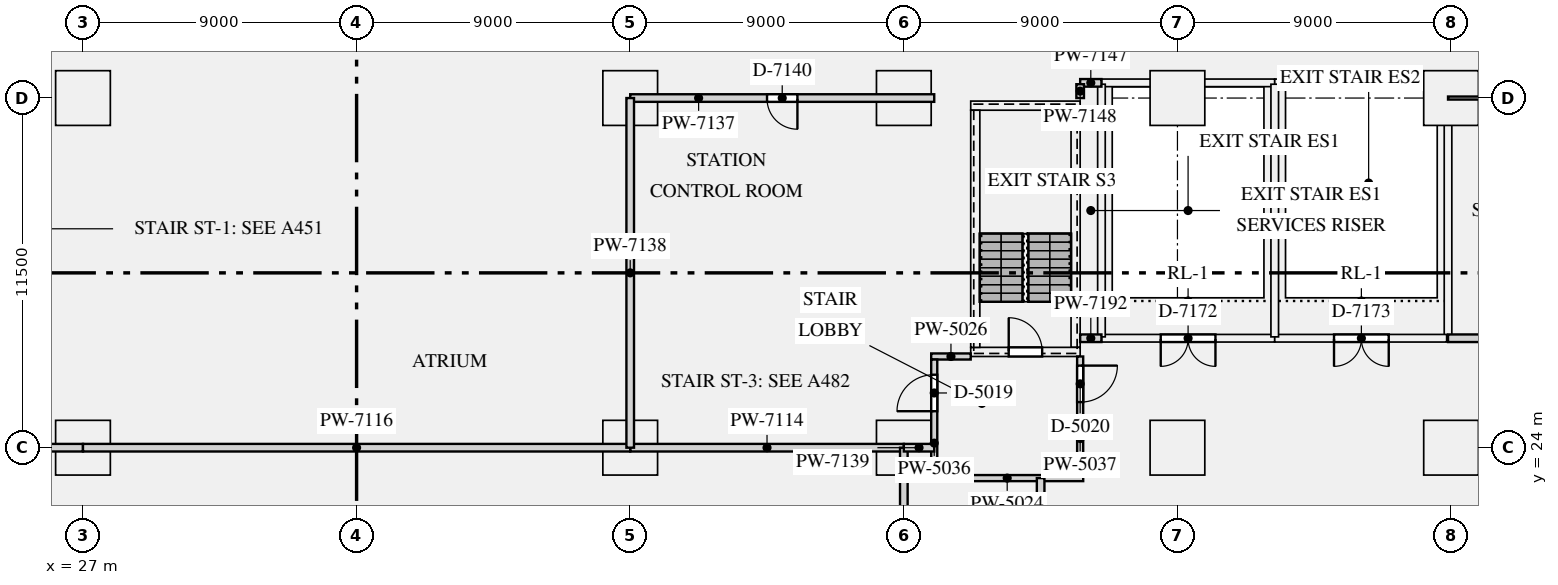
"""IFC4 building model, lengths in metres.
Left out: names, types, materials, properties, quantities, classifications, styles, units other than length and angle.
Written with IfcOpenShell. Run it as: python <this file> out.ifc"""

import sys

from ifc_helpers import new_model, si_unit, direction, frame, frame_2d, origin, origin_2d, place, context, subcontext, project, spatial, rectangle, extrude, element, fill, save


model = new_model("IFC4")
c1 = context("Model", 3, precision=1e-05, world=origin(), true_north=direction((0.0, 1.0)))
c2 = subcontext(c1, "Body", "Model", "MODEL_VIEW")
j1 = project(units=[si_unit("LENGTHUNIT", "METRE"), si_unit("PLANEANGLEUNIT", "RADIAN")], contexts=[c1])
p1 = place(None, origin())
s1 = spatial("IfcSite", under=j1, at=p1, CompositionType="ELEMENT")
p2 = place(p1, origin())
s2 = spatial("IfcBuilding", under=s1, at=p2, CompositionType="ELEMENT")
p3 = place(p2, origin())
s3 = spatial("IfcBuildingStorey", under=s2, at=p3, CompositionType="ELEMENT", Elevation=0.0)
for number, where, z_axis, x_axis in (
    (1, (27.0, 24.0, 0.0), (0.0, 0.0, 1.0), (1.0, 0.0, 0.0)),
    (2, (27.0, 35.5, 0.0), (0.0, 0.0, 1.0), (1.0, 0.0, 0.0)),
    (3, (45.0, 24.0, 0.0), (0.0, 0.0, 1.0), (1.0, 0.0, 0.0)),
    (4, (45.0, 35.5, 0.0), (0.0, 0.0, 1.0), (1.0, 0.0, 0.0)),
    (5, (54.0, 24.0, 0.0), (0.0, 0.0, 1.0), (1.0, 0.0, 0.0)),
    (6, (54.0, 35.5, 0.0), (0.0, 0.0, 1.0), (1.0, 0.0, 0.0)),
    (7, (63.0, 24.0, 0.0), (0.0, 0.0, 1.0), (1.0, 0.0, 0.0)),
    (8, (63.0, 35.5, 0.0), (0.0, 0.0, 1.0), (1.0, 0.0, 0.0)),
    (9, (72.0, 24.0, 0.0), (0.0, 0.0, 1.0), (1.0, 0.0, 0.0)),
    (10, (72.0, 35.5, 0.0), (0.0, 0.0, 1.0), (1.0, 0.0, 0.0)),
):
    element("IfcColumn", number, at=place(p3, frame(where, z_axis=z_axis, x_axis=x_axis)), inside=s3, PredefinedType="COLUMN", context=c2, shape_type="SweptSolid", body=[
        extrude(rectangle(XDim=1.8, YDim=1.8, at=origin_2d()), origin(), (0.0, 0.0, 1.0), 6.5),
    ])
p4 = place(p3, frame((56.2, 27.15, 0.0), z_axis=(0.0, 0.0, 1.0), x_axis=(1.0, 0.0, 0.0)))
e11 = element("IfcWall", 11, at=p4, inside=s3, PredefinedType="SHEAR", context=c2, shape_type="SweptSolid", body=[
    extrude(rectangle(XDim=3.6, YDim=0.3, at=frame_2d((1.8, 0.0))), origin(), (0.0, 0.0, 1.0), 6.5),
])
p5 = place(p4, frame((1.25, 0.0, 0.0)))
e12 = element("IfcOpeningElement", 12, at=p5, cuts=e11, PredefinedType="OPENING", context=c2, shape_type="SweptSolid", body=[
    extrude(rectangle(XDim=1.1, YDim=2.1, at=frame_2d((0.55, 1.05))), frame((0.0, 0.16, 0.0), z_axis=(0.0, -1.0, 0.0), x_axis=(1.0, 0.0, 0.0)), (0.0, 0.0, 1.0), 0.32),
])
p6 = place(p3, frame((56.2, 35.25, 0.0), z_axis=(0.0, 0.0, 1.0), x_axis=(1.0, 0.0, 0.0)))
e13 = element("IfcWall", 13, at=p6, inside=s3, PredefinedType="SHEAR", context=c2, shape_type="SweptSolid", body=[
    extrude(rectangle(XDim=3.6, YDim=0.3, at=frame_2d((1.8, 0.0))), origin(), (0.0, 0.0, 1.0), 6.5),
])
for number, where, z_axis, x_axis in (
    (14, (56.35, 27.3, 0.0), (0.0, 0.0, 1.0), (0.0, 1.0, 0.0)),
    (15, (59.65, 27.3, 0.0), (0.0, 0.0, 1.0), (0.0, 1.0, 0.0)),
):
    element("IfcWall", number, at=place(p3, frame(where, z_axis=z_axis, x_axis=x_axis)), inside=s3, PredefinedType="SHEAR", context=c2, shape_type="SweptSolid", body=[
        extrude(rectangle(XDim=7.8, YDim=0.3, at=frame_2d((3.9, 0.0))), origin(), (0.0, 0.0, 1.0), 6.5),
    ])
p7 = place(p3, frame((54.9, 23.0, 0.0), z_axis=(0.0, 0.0, 1.0), x_axis=(1.0, 0.0, 0.0)))
e16 = element("IfcWall", 16, at=p7, inside=s3, PredefinedType="PARTITIONING", context=c2, shape_type="SweptSolid", body=[
    extrude(rectangle(XDim=5.0, YDim=0.2, at=frame_2d((2.5, 0.0))), origin(), (0.0, 0.0, 1.0), 6.098),
])
p8 = place(p3, frame((54.9, 27.0, 0.0), z_axis=(0.0, 0.0, 1.0), x_axis=(1.0, 0.0, 0.0)))
e17 = element("IfcWall", 17, at=p8, inside=s3, PredefinedType="PARTITIONING", context=c2, shape_type="SweptSolid", body=[
    extrude(rectangle(XDim=1.3, YDim=0.2, at=frame_2d((0.65, 0.0))), origin(), (0.0, 0.0, 1.0), 6.098),
])
p9 = place(p3, frame((55.0, 23.1, 0.0), z_axis=(0.0, 0.0, 1.0), x_axis=(0.0, 1.0, 0.0)))
e18 = element("IfcWall", 18, at=p9, inside=s3, PredefinedType="PARTITIONING", context=c2, shape_type="SweptSolid", body=[
    extrude(rectangle(XDim=3.8, YDim=0.2, at=frame_2d((1.9, 0.0))), origin(), (0.0, 0.0, 1.0), 6.098),
])
p10 = place(p9, frame((2.1, 0.0, 0.0)))
e19 = element("IfcOpeningElement", 19, at=p10, cuts=e18, PredefinedType="OPENING", context=c2, shape_type="SweptSolid", body=[
    extrude(rectangle(XDim=1.2, YDim=2.1, at=frame_2d((0.6, 1.05))), frame((0.0, 0.11, 0.0), z_axis=(0.0, -1.0, 0.0), x_axis=(1.0, 0.0, 0.0)), (0.0, 0.0, 1.0), 0.22),
])
p11 = place(p3, frame((59.8, 23.1, 0.0), z_axis=(0.0, 0.0, 1.0), x_axis=(0.0, 1.0, 0.0)))
e20 = element("IfcWall", 20, at=p11, inside=s3, PredefinedType="PARTITIONING", context=c2, shape_type="SweptSolid", body=[
    extrude(rectangle(XDim=3.9, YDim=0.2, at=frame_2d((1.95, 0.0))), origin(), (0.0, 0.0, 1.0), 6.098),
])
p12 = place(p11, frame((2.4, 0.0, 0.0)))
e21 = element("IfcOpeningElement", 21, at=p12, cuts=e20, PredefinedType="OPENING", context=c2, shape_type="SweptSolid", body=[
    extrude(rectangle(XDim=1.2, YDim=2.1, at=frame_2d((0.6, 1.05))), frame((0.0, 0.11, 0.0), z_axis=(0.0, -1.0, 0.0), x_axis=(1.0, 0.0, 0.0)), (0.0, 0.0, 1.0), 0.22),
])
p13 = place(p3, frame((45.0, 24.0, 0.0), z_axis=(0.0, 0.0, 1.0), x_axis=(1.0, 0.0, 0.0)))
e22 = element("IfcWall", 22, at=p13, inside=s3, PredefinedType="PARTITIONING", context=c2, shape_type="SweptSolid", body=[
    extrude(rectangle(XDim=9.0, YDim=0.25, at=frame_2d((4.5, 0.0))), origin(), (0.0, 0.0, 1.0), 6.098),
])
p14 = place(p3, frame((17.0, 24.0, 0.0), z_axis=(0.0, 0.0, 1.0), x_axis=(1.0, 0.0, 0.0)))
e23 = element("IfcWall", 23, at=p14, inside=s3, PredefinedType="PARTITIONING", context=c2, shape_type="SweptSolid", body=[
    extrude(rectangle(XDim=10.0, YDim=0.25, at=frame_2d((5.0, 0.0))), origin(), (0.0, 0.0, 1.0), 6.098),
])
p15 = place(p3, frame((27.0, 24.0, 0.0), z_axis=(0.0, 0.0, 1.0), x_axis=(1.0, 0.0, 0.0)))
e24 = element("IfcWall", 24, at=p15, inside=s3, PredefinedType="PARTITIONING", context=c2, shape_type="SweptSolid", body=[
    extrude(rectangle(XDim=18.0, YDim=0.25, at=frame_2d((9.0, 0.0))), origin(), (0.0, 0.0, 1.0), 5.148),
])
p16 = place(p3, frame((54.0, 16.0, 0.0), z_axis=(0.0, 0.0, 1.0), x_axis=(0.0, 1.0, 0.0)))
e25 = element("IfcWall", 25, at=p16, inside=s3, PredefinedType="PARTITIONING", context=c2, shape_type="SweptSolid", body=[
    extrude(rectangle(XDim=8.0, YDim=0.25, at=frame_2d((4.0, 0.0))), origin(), (0.0, 0.0, 1.0), 6.098),
])
p17 = place(p16, frame((3.1, 0.0, 0.0)))
e26 = element("IfcOpeningElement", 26, at=p17, cuts=e25, PredefinedType="OPENING", context=c2, shape_type="SweptSolid", body=[
    extrude(rectangle(XDim=1.8, YDim=2.4, at=frame_2d((0.9, 1.2))), frame((0.0, 0.135, 0.0), z_axis=(0.0, -1.0, 0.0), x_axis=(1.0, 0.0, 0.0)), (0.0, 0.0, 1.0), 0.27),
])
p18 = place(p3, frame((45.0, 35.5, 0.0), z_axis=(0.0, 0.0, 1.0), x_axis=(1.0, 0.0, 0.0)))
e27 = element("IfcWall", 27, at=p18, inside=s3, PredefinedType="PARTITIONING", context=c2, shape_type="SweptSolid", body=[
    extrude(rectangle(XDim=10.0, YDim=0.25, at=frame_2d((5.0, 0.0))), origin(), (0.0, 0.0, 1.0), 6.098),
])
p19 = place(p18, frame((4.5, 0.0, 0.0)))
e28 = element("IfcOpeningElement", 28, at=p19, cuts=e27, PredefinedType="OPENING", context=c2, shape_type="SweptSolid", body=[
    extrude(rectangle(XDim=1.0, YDim=2.1, at=frame_2d((0.5, 1.05))), frame((0.0, 0.135, 0.0), z_axis=(0.0, -1.0, 0.0), x_axis=(1.0, 0.0, 0.0)), (0.0, 0.0, 1.0), 0.27),
])
p20 = place(p3, frame((45.0, 24.0, 0.0), z_axis=(0.0, 0.0, 1.0), x_axis=(0.0, 1.0, 0.0)))
e29 = element("IfcWall", 29, at=p20, inside=s3, PredefinedType="PARTITIONING", context=c2, shape_type="SweptSolid", body=[
    extrude(rectangle(XDim=11.5, YDim=0.25, at=frame_2d((5.75, 0.0))), origin(), (0.0, 0.0, 1.0), 5.148),
])
p21 = place(p3, frame((54.0, 24.0, 0.0), z_axis=(0.0, 0.0, 1.0), x_axis=(1.0, 0.0, 0.0)))
e30 = element("IfcWall", 30, at=p21, inside=s3, PredefinedType="PARTITIONING", context=c2, shape_type="SweptSolid", body=[
    extrude(rectangle(XDim=1.0, YDim=0.25, at=frame_2d((0.5, 0.0))), origin(), (0.0, 0.0, 1.0), 6.098),
])
p22 = place(p3, frame((71.9, 35.5, 0.0), z_axis=(0.0, 0.0, 1.0), x_axis=(1.0, 0.0, 0.0)))
e31 = element("IfcWall", 31, at=p22, inside=s3, PredefinedType="PARTITIONING", context=c2, shape_type="SweptSolid", body=[
    extrude(rectangle(XDim=13.6, YDim=0.1, at=frame_2d((6.8, 0.0))), origin(), (0.0, 0.0, 1.0), 6.098),
])
p23 = place(p22, frame((10.5, 0.0, 0.0)))
e32 = element("IfcOpeningElement", 32, at=p23, cuts=e31, PredefinedType="OPENING", context=c2, shape_type="SweptSolid", body=[
    extrude(rectangle(XDim=1.2, YDim=2.1, at=frame_2d((0.6, 1.05))), frame((0.0, 0.06, 0.0), z_axis=(0.0, -1.0, 0.0), x_axis=(1.0, 0.0, 0.0)), (0.0, 0.0, 1.0), 0.12),
])
p24 = place(p22, frame((1.8, 0.0, 0.0)))
e33 = element("IfcOpeningElement", 33, at=p24, cuts=e31, PredefinedType="OPENING", context=c2, shape_type="SweptSolid", body=[
    extrude(rectangle(XDim=0.9, YDim=2.1, at=frame_2d((0.45, 1.05))), frame((0.0, 0.06, 0.0), z_axis=(0.0, -1.0, 0.0), x_axis=(1.0, 0.0, 0.0)), (0.0, 0.0, 1.0), 0.12),
])
p25 = place(p22, frame((5.65, 0.0, 0.0)))
e34 = element("IfcOpeningElement", 34, at=p25, cuts=e31, PredefinedType="OPENING", context=c2, shape_type="SweptSolid", body=[
    extrude(rectangle(XDim=0.9, YDim=2.1, at=frame_2d((0.45, 1.05))), frame((0.0, 0.06, 0.0), z_axis=(0.0, -1.0, 0.0), x_axis=(1.0, 0.0, 0.0)), (0.0, 0.0, 1.0), 0.12),
])
p26 = place(p22, frame((6.95, 0.0, 0.0)))
e35 = element("IfcOpeningElement", 35, at=p26, cuts=e31, PredefinedType="OPENING", context=c2, shape_type="SweptSolid", body=[
    extrude(rectangle(XDim=0.9, YDim=2.1, at=frame_2d((0.45, 1.05))), frame((0.0, 0.06, 0.0), z_axis=(0.0, -1.0, 0.0), x_axis=(1.0, 0.0, 0.0)), (0.0, 0.0, 1.0), 0.12),
])
p27 = place(p3, frame((59.8, 36.0, 0.0), z_axis=(0.0, 0.0, 1.0), x_axis=(1.0, 0.0, 0.0)))
e36 = element("IfcWall", 36, at=p27, inside=s3, PredefinedType="PARTITIONING", context=c2, shape_type="SweptSolid", body=[
    extrude(rectangle(XDim=0.7, YDim=0.25, at=frame_2d((0.35, 0.0))), origin(), (0.0, 0.0, 1.0), 6.098),
])
p28 = place(p3, frame((59.8, 35.5, 0.0), z_axis=(0.0, 0.0, 1.0), x_axis=(0.0, 1.0, 0.0)))
e37 = element("IfcWall", 37, at=p28, inside=s3, PredefinedType="PARTITIONING", context=c2, shape_type="SweptSolid", body=[
    extrude(rectangle(XDim=0.455, YDim=0.25, at=frame_2d((0.228, 0.0))), origin(), (0.0, 0.0, 1.0), 6.098),
])
for number, where, z_axis, x_axis in (
    (38, (60.5, 36.0, 0.0), (0.0, 0.0, 1.0), (1.0, 0.0, 0.0)),
    (39, (66.2, 36.0, 0.0), (0.0, 0.0, 1.0), (1.0, 0.0, 0.0)),
):
    element("IfcWall", number, at=place(p3, frame(where, z_axis=z_axis, x_axis=x_axis)), inside=s3, PredefinedType="SOLIDWALL", context=c2, shape_type="SweptSolid", body=[
        extrude(rectangle(XDim=5.7, YDim=0.25, at=frame_2d((2.85, 0.0))), origin(), (0.0, 0.0, 1.0), 6.098),
    ])
p29 = place(p3, frame((71.9, 35.5, 0.0), z_axis=(0.0, 0.0, 1.0), x_axis=(0.0, 1.0, 0.0)))
e40 = element("IfcWall", 40, at=p29, inside=s3, PredefinedType="SOLIDWALL", context=c2, shape_type="SweptSolid", body=[
    extrude(rectangle(XDim=0.455, YDim=0.25, at=frame_2d((0.228, 0.0))), origin(), (0.0, 0.0, 1.0), 6.098),
])
p30 = place(p3, frame((71.9, 27.6, 0.0), z_axis=(0.0, 0.0, 1.0), x_axis=(1.0, 0.0, 0.0)))
e41 = element("IfcWall", 41, at=p30, inside=s3, PredefinedType="PARTITIONING", context=c2, shape_type="SweptSolid", body=[
    extrude(rectangle(XDim=18.1, YDim=0.25, at=frame_2d((9.05, 0.0))), origin(), (0.0, 0.0, 1.0), 6.098),
])
p31 = place(p3, frame((71.9, 27.645, 0.0), z_axis=(0.0, 0.0, 1.0), x_axis=(0.0, 1.0, 0.0)))
e42 = element("IfcWall", 42, at=p31, inside=s3, PredefinedType="SOLIDWALL", context=c2, shape_type="SweptSolid", body=[
    extrude(rectangle(XDim=7.855, YDim=0.25, at=frame_2d((3.927, 0.0))), origin(), (0.0, 0.0, 1.0), 6.098),
])
p32 = place(p3, frame((59.8, 27.6, 0.0), z_axis=(0.0, 0.0, 1.0), x_axis=(1.0, 0.0, 0.0)))
e43 = element("IfcWall", 43, at=p32, inside=s3, PredefinedType="PARTITIONING", context=c2, shape_type="SweptSolid", body=[
    extrude(rectangle(XDim=0.7, YDim=0.25, at=frame_2d((0.35, 0.0))), origin(), (0.0, 0.0, 1.0), 6.098),
])
p33 = place(p3, frame((60.5, 27.6, 0.0), z_axis=(0.0, 0.0, 1.0), x_axis=(1.0, 0.0, 0.0)))
e44 = element("IfcWall", 44, at=p33, inside=s3, PredefinedType="SOLIDWALL", context=c2, shape_type="SweptSolid", body=[
    extrude(rectangle(XDim=5.7, YDim=0.25, at=frame_2d((2.85, 0.0))), origin(), (0.0, 0.0, 1.0), 6.098),
])
p34 = place(p33, frame((1.95, 0.0, 0.0)))
e45 = element("IfcOpeningElement", 45, at=p34, cuts=e44, PredefinedType="OPENING", context=c2, shape_type="SweptSolid", body=[
    extrude(rectangle(XDim=1.8, YDim=2.4, at=frame_2d((0.9, 1.2))), frame((0.0, 0.135, 0.0), z_axis=(0.0, -1.0, 0.0), x_axis=(1.0, 0.0, 0.0)), (0.0, 0.0, 1.0), 0.27),
])
p35 = place(p3, frame((66.2, 27.6, 0.0), z_axis=(0.0, 0.0, 1.0), x_axis=(1.0, 0.0, 0.0)))
e46 = element("IfcWall", 46, at=p35, inside=s3, PredefinedType="SOLIDWALL", context=c2, shape_type="SweptSolid", body=[
    extrude(rectangle(XDim=5.655, YDim=0.25, at=frame_2d((2.828, 0.0))), origin(), (0.0, 0.0, 1.0), 6.098),
])
p36 = place(p35, frame((1.95, 0.0, 0.0)))
e47 = element("IfcOpeningElement", 47, at=p36, cuts=e46, PredefinedType="OPENING", context=c2, shape_type="SweptSolid", body=[
    extrude(rectangle(XDim=1.8, YDim=2.4, at=frame_2d((0.9, 1.2))), frame((0.0, 0.135, 0.0), z_axis=(0.0, -1.0, 0.0), x_axis=(1.0, 0.0, 0.0)), (0.0, 0.0, 1.0), 0.27),
])
for number, where, z_axis, x_axis in (
    (48, (60.5, 27.645, 0.0), (0.0, 0.0, 1.0), (0.0, 1.0, 0.0)),
    (49, (66.2, 27.645, 0.0), (0.0, 0.0, 1.0), (0.0, 1.0, 0.0)),
):
    element("IfcWall", number, at=place(p3, frame(where, z_axis=z_axis, x_axis=x_axis)), inside=s3, PredefinedType="SOLIDWALL", context=c2, shape_type="SweptSolid", body=[
        extrude(rectangle(XDim=8.31, YDim=0.25, at=frame_2d((4.155, 0.0))), origin(), (0.0, 0.0, 1.0), 6.098),
    ])
p37 = place(p3, frame((58.5, 16.0, 0.0), z_axis=(0.0, 0.0, 1.0), x_axis=(0.0, 1.0, 0.0)))
e50 = element("IfcWall", 50, at=p37, inside=s3, PredefinedType="PARTITIONING", context=c2, shape_type="SweptSolid", body=[
    extrude(rectangle(XDim=7.0, YDim=0.25, at=frame_2d((3.5, 0.0))), origin(), (0.0, 0.0, 1.0), 6.098),
])
p38 = place(p37, frame((2.6, 0.0, 0.0)))
e51 = element("IfcOpeningElement", 51, at=p38, cuts=e50, PredefinedType="OPENING", context=c2, shape_type="SweptSolid", body=[
    extrude(rectangle(XDim=1.8, YDim=2.4, at=frame_2d((0.9, 1.2))), frame((0.0, 0.135, 0.0), z_axis=(0.0, -1.0, 0.0), x_axis=(1.0, 0.0, 0.0)), (0.0, 0.0, 1.0), 0.27),
])
p39 = place(p5, origin())
e52 = element("IfcDoor", 52, at=p39, inside=s3, OperationType="SINGLE_SWING_LEFT", PredefinedType="DOOR", context=c2, shape_type="SweptSolid", body=[
    extrude(rectangle(XDim=1.1, YDim=2.1, at=frame_2d((0.55, 1.05))), frame((0.0, 0.025, 0.0), z_axis=(0.0, -1.0, 0.0), x_axis=(1.0, 0.0, 0.0)), (0.0, 0.0, 1.0), 0.05),
])
fill(e12, e52)
p40 = place(p10, origin())
e53 = element("IfcDoor", 53, at=p40, inside=s3, OperationType="SINGLE_SWING_LEFT", PredefinedType="DOOR", context=c2, shape_type="SweptSolid", body=[
    extrude(rectangle(XDim=1.2, YDim=2.1, at=frame_2d((0.6, 1.05))), frame((0.0, 0.025, 0.0), z_axis=(0.0, -1.0, 0.0), x_axis=(1.0, 0.0, 0.0)), (0.0, 0.0, 1.0), 0.05),
])
fill(e19, e53)
p41 = place(p12, frame((1.2, 0.0, 0.0), z_axis=(0.0, 0.0, 1.0), x_axis=(-1.0, 0.0, 0.0)))
e54 = element("IfcDoor", 54, at=p41, inside=s3, OperationType="SINGLE_SWING_LEFT", PredefinedType="DOOR", context=c2, shape_type="SweptSolid", body=[
    extrude(rectangle(XDim=1.2, YDim=2.1, at=frame_2d((0.6, 1.05))), frame((0.0, 0.025, 0.0), z_axis=(0.0, -1.0, 0.0), x_axis=(1.0, 0.0, 0.0)), (0.0, 0.0, 1.0), 0.05),
])
fill(e21, e54)
p42 = place(p19, frame((1.0, 0.0, 0.0), z_axis=(0.0, 0.0, 1.0), x_axis=(-1.0, 0.0, 0.0)))
e55 = element("IfcDoor", 55, at=p42, inside=s3, OperationType="SINGLE_SWING_LEFT", PredefinedType="DOOR", context=c2, shape_type="SweptSolid", body=[
    extrude(rectangle(XDim=1.0, YDim=2.1, at=frame_2d((0.5, 1.05))), frame((0.0, 0.025, 0.0), z_axis=(0.0, -1.0, 0.0), x_axis=(1.0, 0.0, 0.0)), (0.0, 0.0, 1.0), 0.05),
])
fill(e28, e55)
p43 = place(p34, frame((1.8, 0.0, 0.0), z_axis=(0.0, 0.0, 1.0), x_axis=(-1.0, 0.0, 0.0)))
e56 = element("IfcDoor", 56, at=p43, inside=s3, OperationType="DOUBLE_DOOR_SINGLE_SWING", PredefinedType="DOOR", context=c2, shape_type="SweptSolid", body=[
    extrude(rectangle(XDim=1.8, YDim=2.4, at=frame_2d((0.9, 1.2))), frame((0.0, 0.025, 0.0), z_axis=(0.0, -1.0, 0.0), x_axis=(1.0, 0.0, 0.0)), (0.0, 0.0, 1.0), 0.05),
])
fill(e45, e56)
p44 = place(p36, frame((1.8, 0.0, 0.0), z_axis=(0.0, 0.0, 1.0), x_axis=(-1.0, 0.0, 0.0)))
e57 = element("IfcDoor", 57, at=p44, inside=s3, OperationType="DOUBLE_DOOR_SINGLE_SWING", PredefinedType="DOOR", context=c2, shape_type="SweptSolid", body=[
    extrude(rectangle(XDim=1.8, YDim=2.4, at=frame_2d((0.9, 1.2))), frame((0.0, 0.025, 0.0), z_axis=(0.0, -1.0, 0.0), x_axis=(1.0, 0.0, 0.0)), (0.0, 0.0, 1.0), 0.05),
])
fill(e47, e57)
save(model, sys.argv[1])
